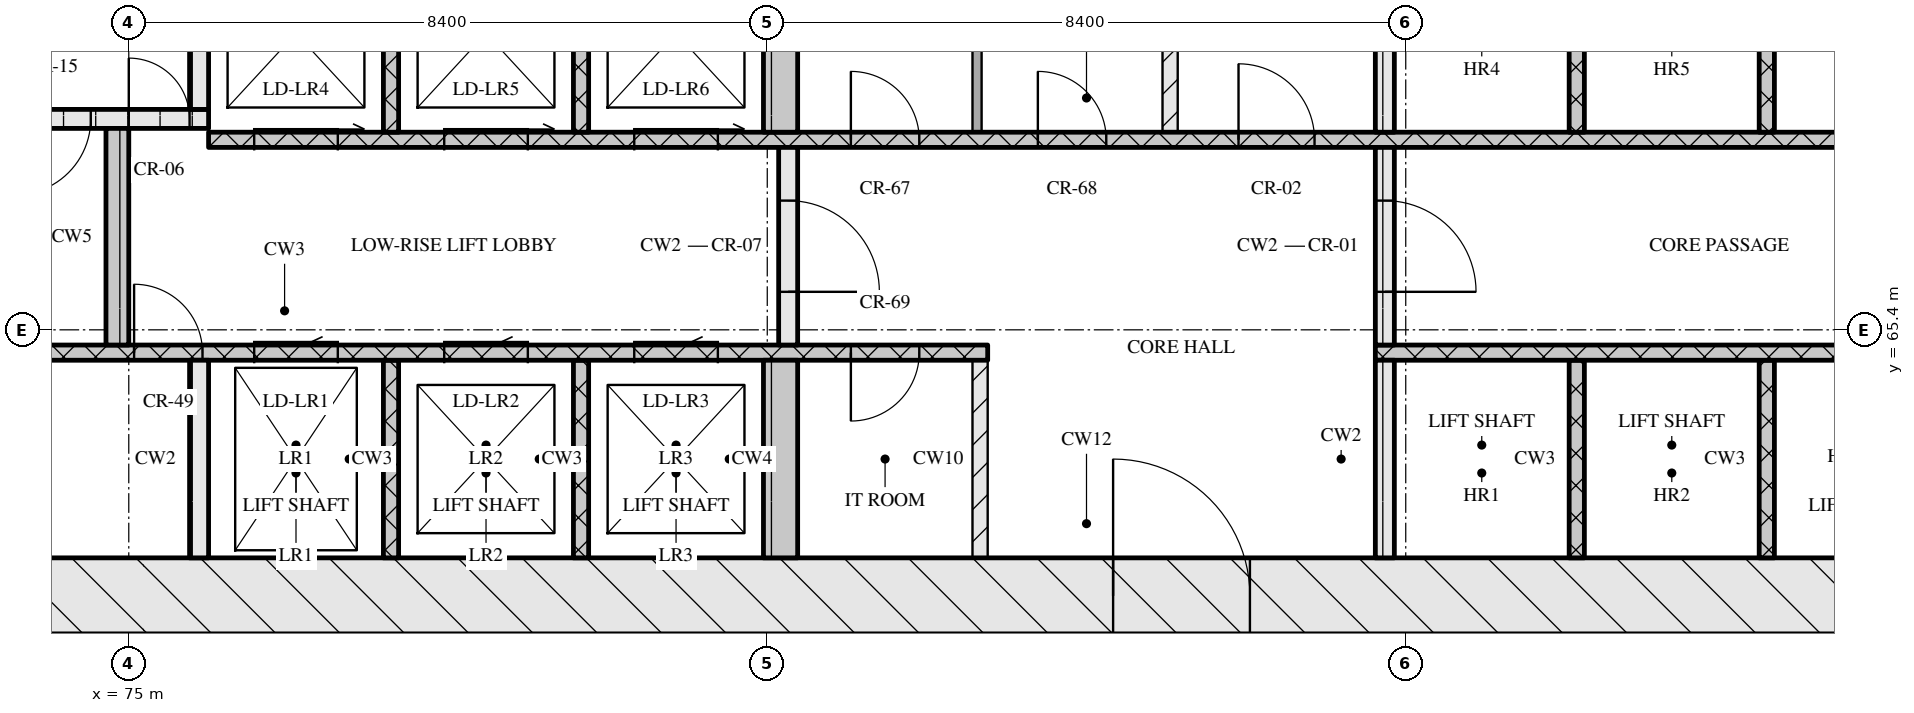
"""IFC4 building model, lengths in metres.
Left out: names, types, materials, properties, quantities, classifications, styles, units other than length and angle.
Written with IfcOpenShell. Run it as: python <this file> out.ifc"""

import sys

from ifc_helpers import new_model, si_unit, direction, frame, frame_2d, origin, place, context, subcontext, project, spatial, rectangle, extrude, element, fill, save


model = new_model("IFC4")
c1 = context("Model", 3, precision=1e-05, world=origin(), true_north=direction((0.0, 1.0)))
c2 = subcontext(c1, "Body", "Model", "MODEL_VIEW")
j1 = project(units=[si_unit("LENGTHUNIT", "METRE"), si_unit("PLANEANGLEUNIT", "RADIAN")], contexts=[c1])
p1 = place(None, origin())
s1 = spatial("IfcSite", under=j1, at=p1, CompositionType="ELEMENT")
p2 = place(p1, origin())
s2 = spatial("IfcBuilding", under=s1, at=p2, CompositionType="ELEMENT")
p3 = place(p2, frame((0.0, 0.0, 95.25)))
s3 = spatial("IfcBuildingStorey", under=s2, at=p3, CompositionType="ELEMENT", Elevation=95.25)
p4 = place(p3, frame((66.8, 61.9, 0.0), z_axis=(0.0, 0.0, 1.0), x_axis=(1.0, 0.0, 0.0)))
e1 = element("IfcWall", 1, at=p4, inside=s3, PredefinedType="SOLIDWALL", context=c2, shape_type="SweptSolid", body=[
    extrude(rectangle(XDim=41.6, YDim=1.0, at=frame_2d((20.8, 0.0))), origin(), (0.0, 0.0, 1.0), 3.32),
])
p5 = place(p4, frame((21.15, 0.0, 0.0)))
e2 = element("IfcOpeningElement", 2, at=p5, cuts=e1, PredefinedType="OPENING", context=c2, shape_type="SweptSolid", body=[
    extrude(rectangle(XDim=1.8, YDim=2.1, at=frame_2d((0.9, 1.05))), frame((0.0, 0.51, 0.0), z_axis=(0.0, -1.0, 0.0), x_axis=(1.0, 0.0, 0.0)), (0.0, 0.0, 1.0), 1.02),
])
p6 = place(p3, frame((75.925, 62.4, 0.0), z_axis=(0.0, 0.0, 1.0), x_axis=(0.0, 1.0, 0.0)))
e3 = element("IfcWall", 3, at=p6, inside=s3, PredefinedType="SOLIDWALL", context=c2, shape_type="SweptSolid", body=[
    extrude(rectangle(XDim=2.6, YDim=0.25, at=frame_2d((1.3, 0.0))), origin(), (0.0, 0.0, 1.0), 3.32),
])
for number, where, z_axis, x_axis in (
    (4, (78.45, 62.4, 0.0), (0.0, 0.0, 1.0), (0.0, 1.0, 0.0)),
    (5, (80.95, 62.4, 0.0), (0.0, 0.0, 1.0), (0.0, 1.0, 0.0)),
):
    element("IfcWall", number, at=place(p3, frame(where, z_axis=z_axis, x_axis=x_axis)), inside=s3, PredefinedType="SOLIDWALL", context=c2, shape_type="SweptSolid", body=[
        extrude(rectangle(XDim=2.6, YDim=0.2, at=frame_2d((1.3, 0.0))), origin(), (0.0, 0.0, 1.0), 3.32),
    ])
p7 = place(p3, frame((83.575, 62.4, 0.0), z_axis=(0.0, 0.0, 1.0), x_axis=(0.0, 1.0, 0.0)))
e6 = element("IfcWall", 6, at=p7, inside=s3, PredefinedType="SOLIDWALL", context=c2, shape_type="SweptSolid", body=[
    extrude(rectangle(XDim=2.6, YDim=0.45, at=frame_2d((1.3, 0.0))), origin(), (0.0, 0.0, 1.0), 3.32),
])
p8 = place(p3, frame((86.2, 62.4, 0.0), z_axis=(0.0, 0.0, 1.0), x_axis=(0.0, 1.0, 0.0)))
e7 = element("IfcWall", 7, at=p8, inside=s3, PredefinedType="PARTITIONING", context=c2, shape_type="SweptSolid", body=[
    extrude(rectangle(XDim=2.6, YDim=0.2, at=frame_2d((1.3, 0.0))), origin(), (0.0, 0.0, 1.0), 3.32),
])
p9 = place(p3, frame((91.525, 62.4, 0.0), z_axis=(0.0, 0.0, 1.0), x_axis=(0.0, 1.0, 0.0)))
e8 = element("IfcWall", 8, at=p9, inside=s3, PredefinedType="SOLIDWALL", context=c2, shape_type="SweptSolid", body=[
    extrude(rectangle(XDim=2.6, YDim=0.25, at=frame_2d((1.3, 0.0))), origin(), (0.0, 0.0, 1.0), 3.32),
])
for number, where, z_axis, x_axis in (
    (9, (94.05, 62.4, 0.0), (0.0, 0.0, 1.0), (0.0, 1.0, 0.0)),
    (10, (96.55, 62.4, 0.0), (0.0, 0.0, 1.0), (0.0, 1.0, 0.0)),
):
    element("IfcWall", number, at=place(p3, frame(where, z_axis=z_axis, x_axis=x_axis)), inside=s3, PredefinedType="SOLIDWALL", context=c2, shape_type="SweptSolid", body=[
        extrude(rectangle(XDim=2.6, YDim=0.2, at=frame_2d((1.3, 0.0))), origin(), (0.0, 0.0, 1.0), 3.32),
    ])
p10 = place(p3, frame((67.8, 65.1, 0.0), z_axis=(0.0, 0.0, 1.0), x_axis=(1.0, 0.0, 0.0)))
e11 = element("IfcWall", 11, at=p10, inside=s3, PredefinedType="SOLIDWALL", context=c2, shape_type="SweptSolid", body=[
    extrude(rectangle(XDim=18.5, YDim=0.2, at=frame_2d((9.25, 0.0))), origin(), (0.0, 0.0, 1.0), 3.32),
])
p11 = place(p10, frame((7.27, 0.0, 0.0)))
e12 = element("IfcOpeningElement", 12, at=p11, cuts=e11, PredefinedType="OPENING", context=c2, shape_type="SweptSolid", body=[
    extrude(rectangle(XDim=0.9, YDim=2.1, at=frame_2d((0.45, 1.05))), frame((0.0, 0.11, 0.0), z_axis=(0.0, -1.0, 0.0), x_axis=(1.0, 0.0, 0.0)), (0.0, 0.0, 1.0), 0.22),
])
p12 = place(p10, frame((8.85, 0.0, 0.0)))
e13 = element("IfcOpeningElement", 13, at=p12, cuts=e11, PredefinedType="OPENING", context=c2, shape_type="SweptSolid", body=[
    extrude(rectangle(XDim=1.1, YDim=2.1, at=frame_2d((0.55, 1.05))), frame((0.0, 0.11, 0.0), z_axis=(0.0, -1.0, 0.0), x_axis=(1.0, 0.0, 0.0)), (0.0, 0.0, 1.0), 0.22),
])
p13 = place(p10, frame((11.35, 0.0, 0.0)))
e14 = element("IfcOpeningElement", 14, at=p13, cuts=e11, PredefinedType="OPENING", context=c2, shape_type="SweptSolid", body=[
    extrude(rectangle(XDim=1.1, YDim=2.1, at=frame_2d((0.55, 1.05))), frame((0.0, 0.11, 0.0), z_axis=(0.0, -1.0, 0.0), x_axis=(1.0, 0.0, 0.0)), (0.0, 0.0, 1.0), 0.22),
])
p14 = place(p10, frame((13.85, 0.0, 0.0)))
e15 = element("IfcOpeningElement", 15, at=p14, cuts=e11, PredefinedType="OPENING", context=c2, shape_type="SweptSolid", body=[
    extrude(rectangle(XDim=1.1, YDim=2.1, at=frame_2d((0.55, 1.05))), frame((0.0, 0.11, 0.0), z_axis=(0.0, -1.0, 0.0), x_axis=(1.0, 0.0, 0.0)), (0.0, 0.0, 1.0), 0.22),
])
p15 = place(p10, frame((16.7, 0.0, 0.0)))
e16 = element("IfcOpeningElement", 16, at=p15, cuts=e11, PredefinedType="OPENING", context=c2, shape_type="SweptSolid", body=[
    extrude(rectangle(XDim=0.9, YDim=2.1, at=frame_2d((0.45, 1.05))), frame((0.0, 0.11, 0.0), z_axis=(0.0, -1.0, 0.0), x_axis=(1.0, 0.0, 0.0)), (0.0, 0.0, 1.0), 0.22),
])
p16 = place(p3, frame((91.4, 65.1, 0.0), z_axis=(0.0, 0.0, 1.0), x_axis=(1.0, 0.0, 0.0)))
e17 = element("IfcWall", 17, at=p16, inside=s3, PredefinedType="SOLIDWALL", context=c2, shape_type="SweptSolid", body=[
    extrude(rectangle(XDim=16.0, YDim=0.2, at=frame_2d((8.0, 0.0))), origin(), (0.0, 0.0, 1.0), 3.32),
])
p17 = place(p16, frame((7.83, 0.0, 0.0)))
e18 = element("IfcOpeningElement", 18, at=p17, cuts=e17, PredefinedType="OPENING", context=c2, shape_type="SweptSolid", body=[
    extrude(rectangle(XDim=0.9, YDim=2.1, at=frame_2d((0.45, 1.05))), frame((0.0, 0.11, 0.0), z_axis=(0.0, -1.0, 0.0), x_axis=(1.0, 0.0, 0.0)), (0.0, 0.0, 1.0), 0.22),
])
p18 = place(p3, frame((74.85, 65.2, 0.0), z_axis=(0.0, 0.0, 1.0), x_axis=(0.0, 1.0, 0.0)))
e19 = element("IfcWall", 19, at=p18, inside=s3, PredefinedType="SOLIDWALL", context=c2, shape_type="SweptSolid", body=[
    extrude(rectangle(XDim=2.85, YDim=0.3, at=frame_2d((1.425, 0.0))), origin(), (0.0, 0.0, 1.0), 3.32),
])
p19 = place(p3, frame((83.675, 65.2, 0.0), z_axis=(0.0, 0.0, 1.0), x_axis=(0.0, 1.0, 0.0)))
e20 = element("IfcWall", 20, at=p19, inside=s3, PredefinedType="SOLIDWALL", context=c2, shape_type="SweptSolid", body=[
    extrude(rectangle(XDim=2.6, YDim=0.25, at=frame_2d((1.3, 0.0))), origin(), (0.0, 0.0, 1.0), 3.32),
])
p20 = place(p19, frame((0.7, 0.0, 0.0)))
e21 = element("IfcOpeningElement", 21, at=p20, cuts=e20, PredefinedType="OPENING", context=c2, shape_type="SweptSolid", body=[
    extrude(rectangle(XDim=1.2, YDim=2.1, at=frame_2d((0.6, 1.05))), frame((0.0, 0.135, 0.0), z_axis=(0.0, -1.0, 0.0), x_axis=(1.0, 0.0, 0.0)), (0.0, 0.0, 1.0), 0.27),
])
p21 = place(p3, frame((91.525, 65.2, 0.0), z_axis=(0.0, 0.0, 1.0), x_axis=(0.0, 1.0, 0.0)))
e22 = element("IfcWall", 22, at=p21, inside=s3, PredefinedType="SOLIDWALL", context=c2, shape_type="SweptSolid", body=[
    extrude(rectangle(XDim=2.6, YDim=0.25, at=frame_2d((1.3, 0.0))), origin(), (0.0, 0.0, 1.0), 3.32),
])
p22 = place(p21, frame((0.7, 0.0, 0.0)))
e23 = element("IfcOpeningElement", 23, at=p22, cuts=e22, PredefinedType="OPENING", context=c2, shape_type="SweptSolid", body=[
    extrude(rectangle(XDim=1.2, YDim=2.1, at=frame_2d((0.6, 1.05))), frame((0.0, 0.135, 0.0), z_axis=(0.0, -1.0, 0.0), x_axis=(1.0, 0.0, 0.0)), (0.0, 0.0, 1.0), 0.27),
])
p23 = place(p3, frame((76.05, 67.9, 0.0), z_axis=(0.0, 0.0, 1.0), x_axis=(1.0, 0.0, 0.0)))
e24 = element("IfcWall", 24, at=p23, inside=s3, PredefinedType="SOLIDWALL", context=c2, shape_type="SweptSolid", body=[
    extrude(rectangle(XDim=23.1, YDim=0.2, at=frame_2d((11.55, 0.0))), origin(), (0.0, 0.0, 1.0), 3.32),
])
p24 = place(p23, frame((0.6, 0.0, 0.0)))
e25 = element("IfcOpeningElement", 25, at=p24, cuts=e24, PredefinedType="OPENING", context=c2, shape_type="SweptSolid", body=[
    extrude(rectangle(XDim=1.1, YDim=2.1, at=frame_2d((0.55, 1.05))), frame((0.0, 0.11, 0.0), z_axis=(0.0, -1.0, 0.0), x_axis=(1.0, 0.0, 0.0)), (0.0, 0.0, 1.0), 0.22),
])
p25 = place(p23, frame((3.1, 0.0, 0.0)))
e26 = element("IfcOpeningElement", 26, at=p25, cuts=e24, PredefinedType="OPENING", context=c2, shape_type="SweptSolid", body=[
    extrude(rectangle(XDim=1.1, YDim=2.1, at=frame_2d((0.55, 1.05))), frame((0.0, 0.11, 0.0), z_axis=(0.0, -1.0, 0.0), x_axis=(1.0, 0.0, 0.0)), (0.0, 0.0, 1.0), 0.22),
])
p26 = place(p23, frame((5.6, 0.0, 0.0)))
e27 = element("IfcOpeningElement", 27, at=p26, cuts=e24, PredefinedType="OPENING", context=c2, shape_type="SweptSolid", body=[
    extrude(rectangle(XDim=1.1, YDim=2.1, at=frame_2d((0.55, 1.05))), frame((0.0, 0.11, 0.0), z_axis=(0.0, -1.0, 0.0), x_axis=(1.0, 0.0, 0.0)), (0.0, 0.0, 1.0), 0.22),
])
p27 = place(p23, frame((8.45, 0.0, 0.0)))
e28 = element("IfcOpeningElement", 28, at=p27, cuts=e24, PredefinedType="OPENING", context=c2, shape_type="SweptSolid", body=[
    extrude(rectangle(XDim=0.9, YDim=2.1, at=frame_2d((0.45, 1.05))), frame((0.0, 0.11, 0.0), z_axis=(0.0, -1.0, 0.0), x_axis=(1.0, 0.0, 0.0)), (0.0, 0.0, 1.0), 0.22),
])
p28 = place(p23, frame((10.91, 0.0, 0.0)))
e29 = element("IfcOpeningElement", 29, at=p28, cuts=e24, PredefinedType="OPENING", context=c2, shape_type="SweptSolid", body=[
    extrude(rectangle(XDim=0.9, YDim=2.1, at=frame_2d((0.45, 1.05))), frame((0.0, 0.11, 0.0), z_axis=(0.0, -1.0, 0.0), x_axis=(1.0, 0.0, 0.0)), (0.0, 0.0, 1.0), 0.22),
])
p29 = place(p23, frame((13.55, 0.0, 0.0)))
e30 = element("IfcOpeningElement", 30, at=p29, cuts=e24, PredefinedType="OPENING", context=c2, shape_type="SweptSolid", body=[
    extrude(rectangle(XDim=1.0, YDim=2.1, at=frame_2d((0.5, 1.05))), frame((0.0, 0.11, 0.0), z_axis=(0.0, -1.0, 0.0), x_axis=(1.0, 0.0, 0.0)), (0.0, 0.0, 1.0), 0.22),
])
for number, where, z_axis, x_axis in (
    (31, (78.45, 68.0, 0.0), (0.0, 0.0, 1.0), (0.0, 1.0, 0.0)),
    (32, (80.95, 68.0, 0.0), (0.0, 0.0, 1.0), (0.0, 1.0, 0.0)),
):
    element("IfcWall", number, at=place(p3, frame(where, z_axis=z_axis, x_axis=x_axis)), inside=s3, PredefinedType="SOLIDWALL", context=c2, shape_type="SweptSolid", body=[
        extrude(rectangle(XDim=2.6, YDim=0.2, at=frame_2d((1.3, 0.0))), origin(), (0.0, 0.0, 1.0), 3.32),
    ])
p30 = place(p3, frame((83.575, 68.0, 0.0), z_axis=(0.0, 0.0, 1.0), x_axis=(0.0, 1.0, 0.0)))
e33 = element("IfcWall", 33, at=p30, inside=s3, PredefinedType="SOLIDWALL", context=c2, shape_type="SweptSolid", body=[
    extrude(rectangle(XDim=2.6, YDim=0.45, at=frame_2d((1.3, 0.0))), origin(), (0.0, 0.0, 1.0), 3.32),
])
p31 = place(p3, frame((86.16, 68.0, 0.0), z_axis=(0.0, 0.0, 1.0), x_axis=(0.0, 1.0, 0.0)))
e34 = element("IfcWall", 34, at=p31, inside=s3, PredefinedType="PARTITIONING", context=c2, shape_type="SweptSolid", body=[
    extrude(rectangle(XDim=2.6, YDim=0.12, at=frame_2d((1.3, 0.0))), origin(), (0.0, 0.0, 1.0), 3.32),
])
p32 = place(p3, frame((88.7, 68.0, 0.0), z_axis=(0.0, 0.0, 1.0), x_axis=(0.0, 1.0, 0.0)))
e35 = element("IfcWall", 35, at=p32, inside=s3, PredefinedType="PARTITIONING", context=c2, shape_type="SweptSolid", body=[
    extrude(rectangle(XDim=2.6, YDim=0.2, at=frame_2d((1.3, 0.0))), origin(), (0.0, 0.0, 1.0), 3.32),
])
p33 = place(p3, frame((91.525, 68.0, 0.0), z_axis=(0.0, 0.0, 1.0), x_axis=(0.0, 1.0, 0.0)))
e36 = element("IfcWall", 36, at=p33, inside=s3, PredefinedType="SOLIDWALL", context=c2, shape_type="SweptSolid", body=[
    extrude(rectangle(XDim=2.6, YDim=0.25, at=frame_2d((1.3, 0.0))), origin(), (0.0, 0.0, 1.0), 3.32),
])
for number, where, z_axis, x_axis in (
    (37, (94.05, 68.0, 0.0), (0.0, 0.0, 1.0), (0.0, 1.0, 0.0)),
    (38, (96.55, 68.0, 0.0), (0.0, 0.0, 1.0), (0.0, 1.0, 0.0)),
):
    element("IfcWall", number, at=place(p3, frame(where, z_axis=z_axis, x_axis=x_axis)), inside=s3, PredefinedType="SOLIDWALL", context=c2, shape_type="SweptSolid", body=[
        extrude(rectangle(XDim=2.6, YDim=0.2, at=frame_2d((1.3, 0.0))), origin(), (0.0, 0.0, 1.0), 3.32),
    ])
p34 = place(p3, frame((67.8, 68.175, 0.0), z_axis=(0.0, 0.0, 1.0), x_axis=(1.0, 0.0, 0.0)))
e39 = element("IfcWall", 39, at=p34, inside=s3, PredefinedType="SOLIDWALL", context=c2, shape_type="SweptSolid", body=[
    extrude(rectangle(XDim=8.25, YDim=0.25, at=frame_2d((4.125, 0.0))), origin(), (0.0, 0.0, 1.0), 3.32),
])
p35 = place(p34, frame((5.7, 0.0, 0.0)))
e40 = element("IfcOpeningElement", 40, at=p35, cuts=e39, PredefinedType="OPENING", context=c2, shape_type="SweptSolid", body=[
    extrude(rectangle(XDim=1.0, YDim=2.1, at=frame_2d((0.5, 1.05))), frame((0.0, 0.135, 0.0), z_axis=(0.0, -1.0, 0.0), x_axis=(1.0, 0.0, 0.0)), (0.0, 0.0, 1.0), 0.27),
])
p36 = place(p34, frame((7.2, 0.0, 0.0)))
e41 = element("IfcOpeningElement", 41, at=p36, cuts=e39, PredefinedType="OPENING", context=c2, shape_type="SweptSolid", body=[
    extrude(rectangle(XDim=0.8, YDim=2.1, at=frame_2d((0.4, 1.05))), frame((0.0, 0.135, 0.0), z_axis=(0.0, -1.0, 0.0), x_axis=(1.0, 0.0, 0.0)), (0.0, 0.0, 1.0), 0.27),
])
p37 = place(p3, frame((75.925, 68.3, 0.0), z_axis=(0.0, 0.0, 1.0), x_axis=(0.0, 1.0, 0.0)))
e42 = element("IfcWall", 42, at=p37, inside=s3, PredefinedType="SOLIDWALL", context=c2, shape_type="SweptSolid", body=[
    extrude(rectangle(XDim=2.3, YDim=0.25, at=frame_2d((1.15, 0.0))), origin(), (0.0, 0.0, 1.0), 3.32),
])
p38 = place(p5, origin())
e43 = element("IfcDoor", 43, at=p38, inside=s3, OperationType="DOUBLE_DOOR_SINGLE_SWING", PredefinedType="DOOR", context=c2, shape_type="SweptSolid", body=[
    extrude(rectangle(XDim=1.8, YDim=2.1, at=frame_2d((0.9, 1.05))), frame((0.0, 0.025, 0.0), z_axis=(0.0, -1.0, 0.0), x_axis=(1.0, 0.0, 0.0)), (0.0, 0.0, 1.0), 0.05),
])
fill(e2, e43)
p39 = place(p11, origin())
e44 = element("IfcDoor", 44, at=p39, inside=s3, OperationType="SINGLE_SWING_LEFT", PredefinedType="DOOR", context=c2, shape_type="SweptSolid", body=[
    extrude(rectangle(XDim=0.9, YDim=2.1, at=frame_2d((0.45, 1.05))), frame((0.0, 0.025, 0.0), z_axis=(0.0, -1.0, 0.0), x_axis=(1.0, 0.0, 0.0)), (0.0, 0.0, 1.0), 0.05),
])
fill(e12, e44)
p40 = place(p12, origin())
e45 = element("IfcDoor", 45, at=p40, inside=s3, OperationType="SLIDING_TO_LEFT", PredefinedType="DOOR", context=c2, shape_type="SweptSolid", body=[
    extrude(rectangle(XDim=1.1, YDim=2.1, at=frame_2d((0.55, 1.05))), frame((0.0, 0.025, 0.0), z_axis=(0.0, -1.0, 0.0), x_axis=(1.0, 0.0, 0.0)), (0.0, 0.0, 1.0), 0.05),
])
fill(e13, e45)
p41 = place(p13, origin())
e46 = element("IfcDoor", 46, at=p41, inside=s3, OperationType="SLIDING_TO_LEFT", PredefinedType="DOOR", context=c2, shape_type="SweptSolid", body=[
    extrude(rectangle(XDim=1.1, YDim=2.1, at=frame_2d((0.55, 1.05))), frame((0.0, 0.025, 0.0), z_axis=(0.0, -1.0, 0.0), x_axis=(1.0, 0.0, 0.0)), (0.0, 0.0, 1.0), 0.05),
])
fill(e14, e46)
p42 = place(p14, origin())
e47 = element("IfcDoor", 47, at=p42, inside=s3, OperationType="SLIDING_TO_LEFT", PredefinedType="DOOR", context=c2, shape_type="SweptSolid", body=[
    extrude(rectangle(XDim=1.1, YDim=2.1, at=frame_2d((0.55, 1.05))), frame((0.0, 0.025, 0.0), z_axis=(0.0, -1.0, 0.0), x_axis=(1.0, 0.0, 0.0)), (0.0, 0.0, 1.0), 0.05),
])
fill(e15, e47)
p43 = place(p15, origin())
e48 = element("IfcDoor", 48, at=p43, inside=s3, OperationType="SINGLE_SWING_RIGHT", PredefinedType="DOOR", context=c2, shape_type="SweptSolid", body=[
    extrude(rectangle(XDim=0.9, YDim=2.1, at=frame_2d((0.45, 1.05))), frame((0.0, 0.025, 0.0), z_axis=(0.0, -1.0, 0.0), x_axis=(1.0, 0.0, 0.0)), (0.0, 0.0, 1.0), 0.05),
])
fill(e16, e48)
p44 = place(p20, origin())
e49 = element("IfcDoor", 49, at=p44, inside=s3, OperationType="SINGLE_SWING_RIGHT", PredefinedType="DOOR", context=c2, shape_type="SweptSolid", body=[
    extrude(rectangle(XDim=1.2, YDim=2.1, at=frame_2d((0.6, 1.05))), frame((0.0, 0.025, 0.0), z_axis=(0.0, -1.0, 0.0), x_axis=(1.0, 0.0, 0.0)), (0.0, 0.0, 1.0), 0.05),
])
fill(e21, e49)
p45 = place(p22, origin())
e50 = element("IfcDoor", 50, at=p45, inside=s3, OperationType="SINGLE_SWING_RIGHT", PredefinedType="DOOR", context=c2, shape_type="SweptSolid", body=[
    extrude(rectangle(XDim=1.2, YDim=2.1, at=frame_2d((0.6, 1.05))), frame((0.0, 0.025, 0.0), z_axis=(0.0, -1.0, 0.0), x_axis=(1.0, 0.0, 0.0)), (0.0, 0.0, 1.0), 0.05),
])
fill(e23, e50)
p46 = place(p24, origin())
e51 = element("IfcDoor", 51, at=p46, inside=s3, OperationType="SLIDING_TO_RIGHT", PredefinedType="DOOR", context=c2, shape_type="SweptSolid", body=[
    extrude(rectangle(XDim=1.1, YDim=2.1, at=frame_2d((0.55, 1.05))), frame((0.0, 0.025, 0.0), z_axis=(0.0, -1.0, 0.0), x_axis=(1.0, 0.0, 0.0)), (0.0, 0.0, 1.0), 0.05),
])
fill(e25, e51)
p47 = place(p25, origin())
e52 = element("IfcDoor", 52, at=p47, inside=s3, OperationType="SLIDING_TO_RIGHT", PredefinedType="DOOR", context=c2, shape_type="SweptSolid", body=[
    extrude(rectangle(XDim=1.1, YDim=2.1, at=frame_2d((0.55, 1.05))), frame((0.0, 0.025, 0.0), z_axis=(0.0, -1.0, 0.0), x_axis=(1.0, 0.0, 0.0)), (0.0, 0.0, 1.0), 0.05),
])
fill(e26, e52)
p48 = place(p26, origin())
e53 = element("IfcDoor", 53, at=p48, inside=s3, OperationType="SLIDING_TO_RIGHT", PredefinedType="DOOR", context=c2, shape_type="SweptSolid", body=[
    extrude(rectangle(XDim=1.1, YDim=2.1, at=frame_2d((0.55, 1.05))), frame((0.0, 0.025, 0.0), z_axis=(0.0, -1.0, 0.0), x_axis=(1.0, 0.0, 0.0)), (0.0, 0.0, 1.0), 0.05),
])
fill(e27, e53)
p49 = place(p27, origin())
e54 = element("IfcDoor", 54, at=p49, inside=s3, OperationType="SINGLE_SWING_LEFT", PredefinedType="DOOR", context=c2, shape_type="SweptSolid", body=[
    extrude(rectangle(XDim=0.9, YDim=2.1, at=frame_2d((0.45, 1.05))), frame((0.0, 0.025, 0.0), z_axis=(0.0, -1.0, 0.0), x_axis=(1.0, 0.0, 0.0)), (0.0, 0.0, 1.0), 0.05),
])
fill(e28, e54)
p50 = place(p28, origin())
e55 = element("IfcDoor", 55, at=p50, inside=s3, OperationType="SINGLE_SWING_LEFT", PredefinedType="DOOR", context=c2, shape_type="SweptSolid", body=[
    extrude(rectangle(XDim=0.9, YDim=2.1, at=frame_2d((0.45, 1.05))), frame((0.0, 0.025, 0.0), z_axis=(0.0, -1.0, 0.0), x_axis=(1.0, 0.0, 0.0)), (0.0, 0.0, 1.0), 0.05),
])
fill(e29, e55)
p51 = place(p29, origin())
e56 = element("IfcDoor", 56, at=p51, inside=s3, OperationType="SINGLE_SWING_LEFT", PredefinedType="DOOR", context=c2, shape_type="SweptSolid", body=[
    extrude(rectangle(XDim=1.0, YDim=2.1, at=frame_2d((0.5, 1.05))), frame((0.0, 0.025, 0.0), z_axis=(0.0, -1.0, 0.0), x_axis=(1.0, 0.0, 0.0)), (0.0, 0.0, 1.0), 0.05),
])
fill(e30, e56)
p52 = place(p35, origin())
e57 = element("IfcDoor", 57, at=p52, inside=s3, OperationType="SINGLE_SWING_RIGHT", PredefinedType="DOOR", context=c2, shape_type="SweptSolid", body=[
    extrude(rectangle(XDim=1.0, YDim=2.1, at=frame_2d((0.5, 1.05))), frame((0.0, 0.025, 0.0), z_axis=(0.0, -1.0, 0.0), x_axis=(1.0, 0.0, 0.0)), (0.0, 0.0, 1.0), 0.05),
])
fill(e40, e57)
p53 = place(p36, origin())
e58 = element("IfcDoor", 58, at=p53, inside=s3, OperationType="SINGLE_SWING_LEFT", PredefinedType="DOOR", context=c2, shape_type="SweptSolid", body=[
    extrude(rectangle(XDim=0.8, YDim=2.1, at=frame_2d((0.4, 1.05))), frame((0.0, 0.025, 0.0), z_axis=(0.0, -1.0, 0.0), x_axis=(1.0, 0.0, 0.0)), (0.0, 0.0, 1.0), 0.05),
])
fill(e41, e58)
save(model, sys.argv[1])
